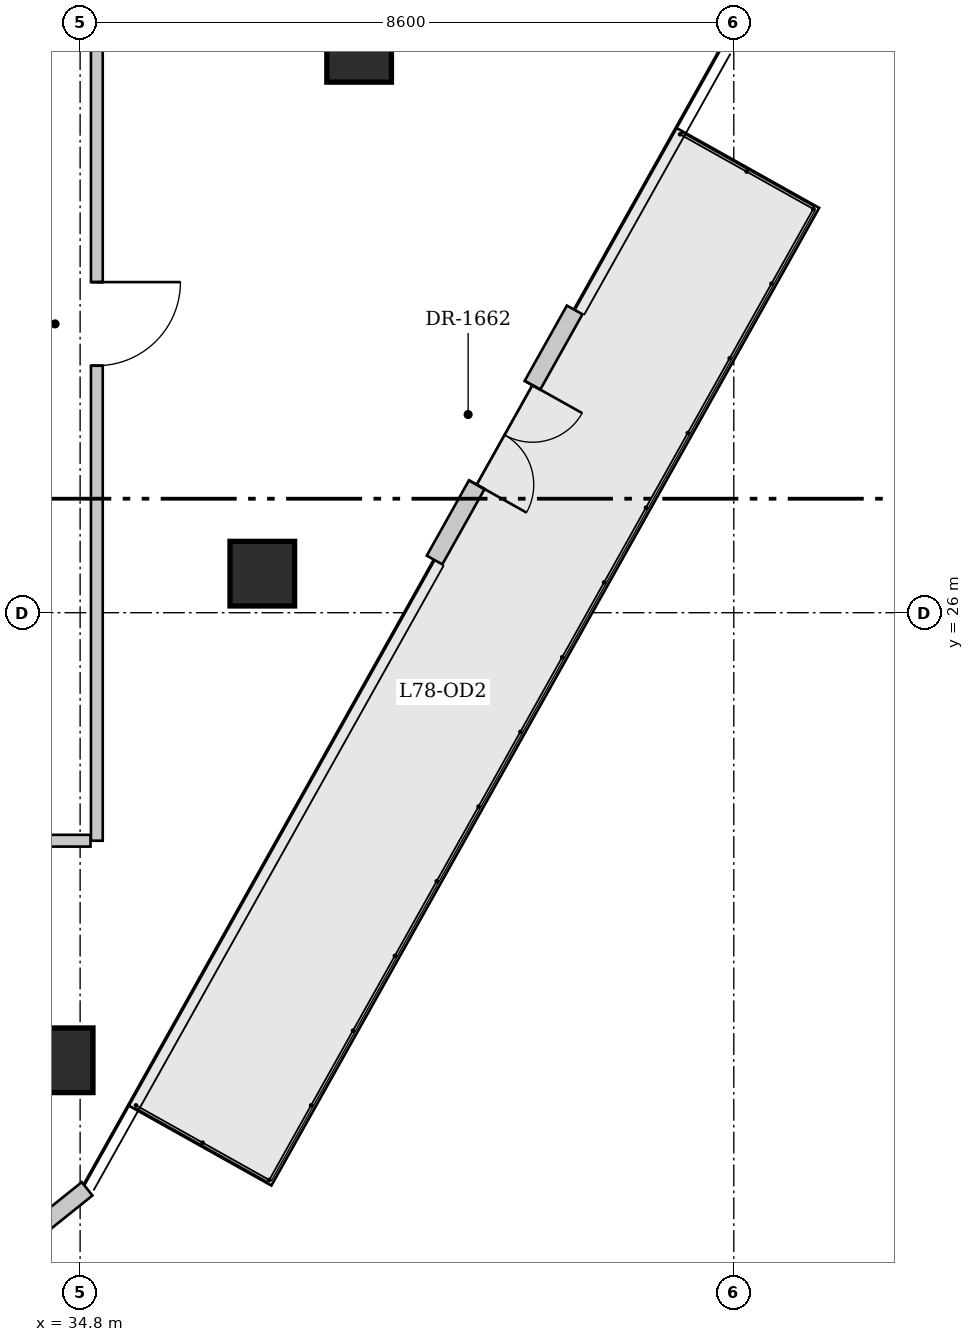
"""IFC4 building model, lengths in metres.
Left out: names, types, materials, properties, quantities, classifications, styles, units other than length and angle.
Written with IfcOpenShell. Run it as: python <this file> out.ifc"""

import sys

from ifc_helpers import new_model, si_unit, direction, frame, frame_2d, origin, origin_2d, place, context, subcontext, project, spatial, rectangle, extrude, source, transform, mapped, element, fill, save


model = new_model("IFC4")
c1 = context("Model", 3, precision=1e-05, world=origin(), true_north=direction((0.0, 1.0)))
c2 = subcontext(c1, "Body", "Model", "MODEL_VIEW")
j1 = project(units=[si_unit("LENGTHUNIT", "METRE"), si_unit("PLANEANGLEUNIT", "RADIAN")], contexts=[c1])
p1 = place(None, origin())
s1 = spatial("IfcSite", under=j1, at=p1, CompositionType="ELEMENT")
p2 = place(p1, origin())
s2 = spatial("IfcBuilding", under=s1, at=p2, CompositionType="ELEMENT")
p3 = place(p2, frame((0.0, 0.0, 291.8)))
s3 = spatial("IfcBuildingStorey", under=s2, at=p3, CompositionType="ELEMENT", Elevation=291.8)
for number, where, z_axis, x_axis in (
    (1, (38.471, 33.406, 0.0), (0.0, 0.0, 1.0), (1.0, 0.0, 0.0)),
    (2, (37.197, 26.514, 0.0), (0.0, 0.0, 1.0), (1.0, 0.0, 0.0)),
    (3, (34.544, 20.111, 0.0), (0.0, 0.0, 1.0), (1.0, 0.0, 0.0)),
):
    element("IfcColumn", number, at=place(p3, frame(where, z_axis=z_axis, x_axis=x_axis)), inside=s3, PredefinedType="COLUMN", context=c2, shape_type="SweptSolid", body=[
        extrude(rectangle(XDim=0.85, YDim=0.85, at=origin_2d()), origin(), (0.0, 0.0, 1.0), 3.94),
    ])
p4 = place(p3, frame((41.307, 29.984, 0.0), z_axis=(0.0, 0.0, 1.0), x_axis=(-0.488739356695, -0.87242984888, 0.0)))
e4 = element("IfcWall", 4, at=p4, inside=s3, PredefinedType="SOLIDWALL", context=c2, shape_type="SweptSolid", body=[
    extrude(rectangle(XDim=3.772, YDim=0.235, at=frame_2d((1.886, 0.0))), origin(), (0.0, 0.0, 1.0), 3.94),
])
p5 = place(p4, frame((1.136, 0.0, 0.0)))
e5 = element("IfcOpeningElement", 5, at=p5, cuts=e4, PredefinedType="OPENING", context=c2, shape_type="SweptSolid", body=[
    extrude(rectangle(XDim=1.5, YDim=2.25, at=frame_2d((0.75, 1.125))), frame((0.0, 0.127, 0.0), z_axis=(0.0, -1.0, 0.0), x_axis=(1.0, 0.0, 0.0)), (0.0, 0.0, 1.0), 0.255),
])
p6 = place(p3, frame((34.892, 18.42, 0.0), z_axis=(0.0, 0.0, 1.0), x_axis=(-0.77987797323, -0.625931583218, 0.0)))
e6 = element("IfcWall", 6, at=p6, inside=s3, PredefinedType="SOLIDWALL", context=c2, shape_type="SweptSolid", body=[
    extrude(rectangle(XDim=2.502, YDim=0.225, at=frame_2d((1.251, 0.0))), origin(), (0.0, 0.0, 1.0), 3.94),
])
p7 = place(p3, frame((35.02, 36.6, 0.0), z_axis=(0.0, 0.0, 1.0), x_axis=(0.0, -1.0, 0.0)))
e7 = element("IfcWall", 7, at=p7, inside=s3, PredefinedType="PARTITIONING", context=c2, shape_type="SweptSolid", body=[
    extrude(rectangle(XDim=13.6, YDim=0.155, at=frame_2d((6.8, 0.0))), origin(), (0.0, 0.0, 1.0), 3.94),
])
p8 = place(p7, frame((6.25, 0.0, 0.0)))
e8 = element("IfcOpeningElement", 8, at=p8, cuts=e7, PredefinedType="OPENING", context=c2, shape_type="SweptSolid", body=[
    extrude(rectangle(XDim=1.1, YDim=2.2, at=frame_2d((0.55, 1.1))), frame((0.0, 0.087, 0.0), z_axis=(0.0, -1.0, 0.0), x_axis=(1.0, 0.0, 0.0)), (0.0, 0.0, 1.0), 0.175),
])
p9 = place(p3, frame((34.937, 23.0, 0.0), z_axis=(0.0, 0.0, 1.0), x_axis=(-1.0, 0.0, 0.0)))
e9 = element("IfcWall", 9, at=p9, inside=s3, PredefinedType="PARTITIONING", context=c2, shape_type="SweptSolid", body=[
    extrude(rectangle(XDim=7.953, YDim=0.155, at=frame_2d((3.977, 0.0))), origin(), (0.0, 0.0, 1.0), 3.94),
])
m1 = source(origin(), c2, "Body", "SweptSolid", [
    extrude(rectangle(XDim=1.5, YDim=2.25, at=frame_2d((0.75, 1.125))), frame((0.0, 0.025, 0.0), z_axis=(0.0, -1.0, 0.0), x_axis=(1.0, 0.0, 0.0)), (0.0, 0.0, 1.0), 0.05),
])
p10 = place(p5, origin())
e10 = element("IfcDoor", 10, at=p10, inside=s3, OperationType="DOUBLE_DOOR_SINGLE_SWING", PredefinedType="DOOR", context=c2, shape_type="MappedRepresentation", body=[
    mapped(m1, transform((0.0, 0.0, 0.0), x_axis=(1.0, 0.0, 0.0), y_axis=(0.0, 1.0, 0.0), z_axis=(0.0, 0.0, 1.0), scale=1.0)),
])
fill(e5, e10)
m2 = source(origin(), c2, "Body", "SweptSolid", [
    extrude(rectangle(XDim=1.1, YDim=2.2, at=frame_2d((0.55, 1.1))), frame((0.0, 0.025, 0.0), z_axis=(0.0, -1.0, 0.0), x_axis=(1.0, 0.0, 0.0)), (0.0, 0.0, 1.0), 0.05),
])
p11 = place(p8, origin())
e11 = element("IfcDoor", 11, at=p11, inside=s3, OperationType="SINGLE_SWING_LEFT", PredefinedType="DOOR", context=c2, shape_type="MappedRepresentation", body=[
    mapped(m2, transform((0.0, 0.0, 0.0), x_axis=(1.0, 0.0, 0.0), y_axis=(0.0, 1.0, 0.0), z_axis=(0.0, 0.0, 1.0), scale=1.0)),
])
fill(e8, e11)
save(model, sys.argv[1])
